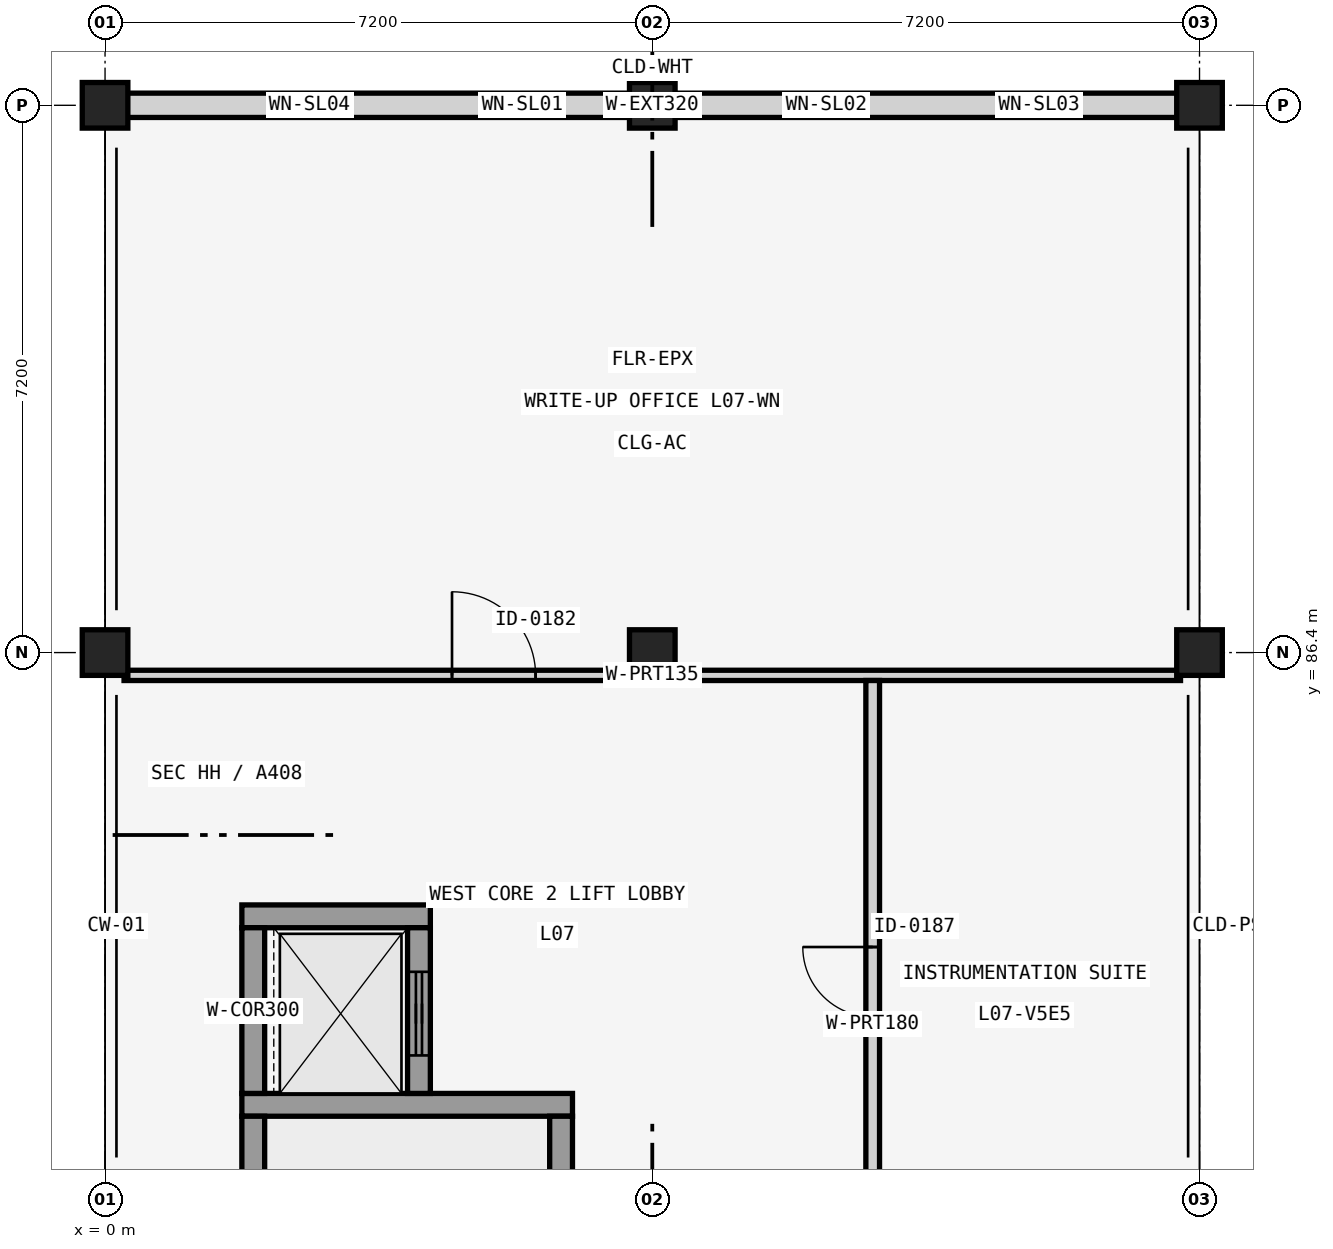
"""IFC4 building model, lengths in metres.
Left out: names, types, materials, properties, quantities, classifications, styles, units other than length and angle.
Written with IfcOpenShell. Run it as: python <this file> out.ifc"""

import sys

from ifc_helpers import new_model, si_unit, direction, frame, frame_2d, origin, origin_2d, place, context, subcontext, project, spatial, rectangle, extrude, element, fill, save


model = new_model("IFC4")
c1 = context("Model", 3, precision=1e-05, world=origin(), true_north=direction((0.0, 1.0)))
c2 = subcontext(c1, "Body", "Model", "MODEL_VIEW")
j1 = project(units=[si_unit("LENGTHUNIT", "METRE"), si_unit("PLANEANGLEUNIT", "RADIAN")], contexts=[c1])
p1 = place(None, origin())
s1 = spatial("IfcSite", under=j1, at=p1, CompositionType="ELEMENT")
p2 = place(p1, origin())
s2 = spatial("IfcBuilding", under=s1, at=p2, CompositionType="ELEMENT")
p3 = place(p2, frame((0.0, 0.0, 29.76)))
s3 = spatial("IfcBuildingStorey", under=s2, at=p3, CompositionType="ELEMENT", Elevation=29.76)
for number, where, z_axis, x_axis in (
    (1, (0.0, 86.4, 0.0), (0.0, 0.0, 1.0), (1.0, 0.0, 0.0)),
    (2, (0.0, 93.6, 0.0), (0.0, 0.0, 1.0), (1.0, 0.0, 0.0)),
    (3, (7.2, 86.4, 0.0), (0.0, 0.0, 1.0), (1.0, 0.0, 0.0)),
    (4, (7.2, 93.6, 0.0), (0.0, 0.0, 1.0), (1.0, 0.0, 0.0)),
    (5, (14.4, 86.4, 0.0), (0.0, 0.0, 1.0), (1.0, 0.0, 0.0)),
    (6, (14.4, 93.6, 0.0), (0.0, 0.0, 1.0), (1.0, 0.0, 0.0)),
):
    element("IfcColumn", number, at=place(p3, frame(where, z_axis=z_axis, x_axis=x_axis)), inside=s3, PredefinedType="COLUMN", context=c2, shape_type="SweptSolid", body=[
        extrude(rectangle(XDim=0.6, YDim=0.6, at=origin_2d()), origin(), (0.0, 0.0, 1.0), 4.16),
    ])
p4 = place(p3, frame((0.29, 93.6, 0.0), z_axis=(0.0, 0.0, 1.0), x_axis=(1.0, 0.0, 0.0)))
e7 = element("IfcWall", 7, at=p4, inside=s3, PredefinedType="SOLIDWALL", context=c2, shape_type="SweptSolid", body=[
    extrude(rectangle(XDim=13.82, YDim=0.32, at=frame_2d((6.91, 0.0))), origin(), (0.0, 0.0, 1.0), 3.21),
])
p5 = place(p4, frame((2.175, 0.0, 0.85)))
e8 = element("IfcOpeningElement", 8, at=p5, cuts=e7, PredefinedType="OPENING", context=c2, shape_type="SweptSolid", body=[
    extrude(rectangle(XDim=0.45, YDim=2.1, at=frame_2d((0.225, 1.05))), frame((0.0, 0.17, 0.0), z_axis=(0.0, -1.0, 0.0), x_axis=(1.0, 0.0, 0.0)), (0.0, 0.0, 1.0), 0.34),
])
p6 = place(p4, frame((4.975, 0.0, 0.65)))
e9 = element("IfcOpeningElement", 9, at=p6, cuts=e7, PredefinedType="OPENING", context=c2, shape_type="SweptSolid", body=[
    extrude(rectangle(XDim=0.45, YDim=2.4, at=frame_2d((0.225, 1.2))), frame((0.0, 0.17, 0.0), z_axis=(0.0, -1.0, 0.0), x_axis=(1.0, 0.0, 0.0)), (0.0, 0.0, 1.0), 0.34),
])
p7 = place(p4, frame((8.95, 0.0, 0.65)))
e10 = element("IfcOpeningElement", 10, at=p7, cuts=e7, PredefinedType="OPENING", context=c2, shape_type="SweptSolid", body=[
    extrude(rectangle(XDim=0.5, YDim=2.4, at=frame_2d((0.25, 1.2))), frame((0.0, 0.17, 0.0), z_axis=(0.0, -1.0, 0.0), x_axis=(1.0, 0.0, 0.0)), (0.0, 0.0, 1.0), 0.34),
])
p8 = place(p4, frame((11.725, 0.0, 0.85)))
e11 = element("IfcOpeningElement", 11, at=p8, cuts=e7, PredefinedType="OPENING", context=c2, shape_type="SweptSolid", body=[
    extrude(rectangle(XDim=0.55, YDim=2.2, at=frame_2d((0.275, 1.1))), frame((0.0, 0.17, 0.0), z_axis=(0.0, -1.0, 0.0), x_axis=(1.0, 0.0, 0.0)), (0.0, 0.0, 1.0), 0.34),
])
p9 = place(p3, frame((1.8, 80.45, 0.0), z_axis=(0.0, 0.0, 1.0), x_axis=(1.0, 0.0, 0.0)))
e12 = element("IfcWall", 12, at=p9, inside=s3, PredefinedType="SHEAR", context=c2, shape_type="SweptSolid", body=[
    extrude(rectangle(XDim=4.35, YDim=0.3, at=frame_2d((2.175, 0.0))), origin(), (0.0, 0.0, 1.0), 3.81),
])
p10 = place(p3, frame((1.95, 72.5, 0.0), z_axis=(0.0, 0.0, 1.0), x_axis=(0.0, 1.0, 0.0)))
e13 = element("IfcWall", 13, at=p10, inside=s3, PredefinedType="SHEAR", context=c2, shape_type="SweptSolid", body=[
    extrude(rectangle(XDim=7.8, YDim=0.3, at=frame_2d((3.9, 0.0))), origin(), (0.0, 0.0, 1.0), 3.81),
])
p11 = place(p3, frame((6.0, 72.5, 0.0), z_axis=(0.0, 0.0, 1.0), x_axis=(0.0, 1.0, 0.0)))
e14 = element("IfcWall", 14, at=p11, inside=s3, PredefinedType="SHEAR", context=c2, shape_type="SweptSolid", body=[
    extrude(rectangle(XDim=7.8, YDim=0.3, at=frame_2d((3.9, 0.0))), origin(), (0.0, 0.0, 1.0), 3.81),
])
p12 = place(p11, frame((0.4, 0.0, 0.0)))
e15 = element("IfcOpeningElement", 15, at=p12, cuts=e14, PredefinedType="OPENING", context=c2, shape_type="SweptSolid", body=[
    extrude(rectangle(XDim=1.15, YDim=2.2, at=frame_2d((0.575, 1.1))), frame((0.0, 0.16, 0.0), z_axis=(0.0, -1.0, 0.0), x_axis=(1.0, 0.0, 0.0)), (0.0, 0.0, 1.0), 0.32),
])
p13 = place(p3, frame((1.8, 82.93, 0.0), z_axis=(0.0, 0.0, 1.0), x_axis=(1.0, 0.0, 0.0)))
e16 = element("IfcWall", 16, at=p13, inside=s3, PredefinedType="SHEAR", context=c2, shape_type="SweptSolid", body=[
    extrude(rectangle(XDim=2.48, YDim=0.3, at=frame_2d((1.24, 0.0))), origin(), (0.0, 0.0, 1.0), 3.81),
])
p14 = place(p3, frame((1.95, 80.6, 0.0), z_axis=(0.0, 0.0, 1.0), x_axis=(0.0, 1.0, 0.0)))
e17 = element("IfcWall", 17, at=p14, inside=s3, PredefinedType="SHEAR", context=c2, shape_type="SweptSolid", body=[
    extrude(rectangle(XDim=2.18, YDim=0.3, at=frame_2d((1.09, 0.0))), origin(), (0.0, 0.0, 1.0), 3.81),
])
p15 = place(p3, frame((4.13, 80.6, 0.0), z_axis=(0.0, 0.0, 1.0), x_axis=(0.0, 1.0, 0.0)))
e18 = element("IfcWall", 18, at=p15, inside=s3, PredefinedType="SHEAR", context=c2, shape_type="SweptSolid", body=[
    extrude(rectangle(XDim=2.18, YDim=0.3, at=frame_2d((1.09, 0.0))), origin(), (0.0, 0.0, 1.0), 3.81),
])
p16 = place(p15, frame((0.5, 0.0, 0.0)))
e19 = element("IfcOpeningElement", 19, at=p16, cuts=e18, PredefinedType="OPENING", context=c2, shape_type="SweptSolid", body=[
    extrude(rectangle(XDim=1.1, YDim=2.2, at=frame_2d((0.55, 1.1))), frame((0.0, 0.16, 0.0), z_axis=(0.0, -1.0, 0.0), x_axis=(1.0, 0.0, 0.0)), (0.0, 0.0, 1.0), 0.32),
])
p17 = place(p3, frame((0.25, 86.1, 0.0), z_axis=(0.0, 0.0, 1.0), x_axis=(1.0, 0.0, 0.0)))
e20 = element("IfcWall", 20, at=p17, inside=s3, PredefinedType="PARTITIONING", context=c2, shape_type="SweptSolid", body=[
    extrude(rectangle(XDim=13.9, YDim=0.135, at=frame_2d((6.95, 0.0))), origin(), (0.0, 0.0, 1.0), 3.21),
])
p18 = place(p17, frame((4.315, 0.0, 0.0)))
e21 = element("IfcOpeningElement", 21, at=p18, cuts=e20, PredefinedType="OPENING", context=c2, shape_type="SweptSolid", body=[
    extrude(rectangle(XDim=1.1, YDim=2.15, at=frame_2d((0.55, 1.075))), frame((0.0, 0.078, 0.0), z_axis=(0.0, -1.0, 0.0), x_axis=(1.0, 0.0, 0.0)), (0.0, 0.0, 1.0), 0.155),
])
p19 = place(p3, frame((10.1, 78.1, 0.0), z_axis=(0.0, 0.0, 1.0), x_axis=(0.0, 1.0, 0.0)))
e22 = element("IfcWall", 22, at=p19, inside=s3, PredefinedType="PARTITIONING", context=c2, shape_type="SweptSolid", body=[
    extrude(rectangle(XDim=7.932, YDim=0.18, at=frame_2d((3.966, 0.0))), origin(), (0.0, 0.0, 1.0), 3.81),
])
p20 = place(p19, frame((3.506, 0.0, 0.0)))
e23 = element("IfcOpeningElement", 23, at=p20, cuts=e22, PredefinedType="OPENING", context=c2, shape_type="SweptSolid", body=[
    extrude(rectangle(XDim=0.92, YDim=2.1, at=frame_2d((0.46, 1.05))), frame((0.0, 0.1, 0.0), z_axis=(0.0, -1.0, 0.0), x_axis=(1.0, 0.0, 0.0)), (0.0, 0.0, 1.0), 0.2),
])
p21 = place(p5, origin())
e24 = element("IfcWindow", 24, at=p21, inside=s3, PartitioningType="SINGLE_PANEL", PredefinedType="WINDOW", context=c2, shape_type="SweptSolid", body=[
    extrude(rectangle(XDim=0.45, YDim=2.1, at=frame_2d((0.225, 1.05))), frame((0.0, 0.03, 0.0), z_axis=(0.0, -1.0, 0.0), x_axis=(1.0, 0.0, 0.0)), (0.0, 0.0, 1.0), 0.06),
])
fill(e8, e24)
p22 = place(p6, origin())
e25 = element("IfcWindow", 25, at=p22, inside=s3, PartitioningType="SINGLE_PANEL", PredefinedType="WINDOW", context=c2, shape_type="SweptSolid", body=[
    extrude(rectangle(XDim=0.45, YDim=2.4, at=frame_2d((0.225, 1.2))), frame((0.0, 0.03, 0.0), z_axis=(0.0, -1.0, 0.0), x_axis=(1.0, 0.0, 0.0)), (0.0, 0.0, 1.0), 0.06),
])
fill(e9, e25)
p23 = place(p7, origin())
e26 = element("IfcWindow", 26, at=p23, inside=s3, PartitioningType="SINGLE_PANEL", PredefinedType="WINDOW", context=c2, shape_type="SweptSolid", body=[
    extrude(rectangle(XDim=0.5, YDim=2.4, at=frame_2d((0.25, 1.2))), frame((0.0, 0.03, 0.0), z_axis=(0.0, -1.0, 0.0), x_axis=(1.0, 0.0, 0.0)), (0.0, 0.0, 1.0), 0.06),
])
fill(e10, e26)
p24 = place(p8, origin())
e27 = element("IfcWindow", 27, at=p24, inside=s3, PartitioningType="SINGLE_PANEL", PredefinedType="WINDOW", context=c2, shape_type="SweptSolid", body=[
    extrude(rectangle(XDim=0.55, YDim=2.2, at=frame_2d((0.275, 1.1))), frame((0.0, 0.03, 0.0), z_axis=(0.0, -1.0, 0.0), x_axis=(1.0, 0.0, 0.0)), (0.0, 0.0, 1.0), 0.06),
])
fill(e11, e27)
p25 = place(p16, origin())
e28 = element("IfcDoor", 28, at=p25, inside=s3, OperationType="SLIDING_TO_LEFT", PredefinedType="DOOR", context=c2, shape_type="SweptSolid", body=[
    extrude(rectangle(XDim=1.1, YDim=2.2, at=frame_2d((0.55, 1.1))), frame((0.0, 0.025, 0.0), z_axis=(0.0, -1.0, 0.0), x_axis=(1.0, 0.0, 0.0)), (0.0, 0.0, 1.0), 0.05),
])
fill(e19, e28)
p26 = place(p18, origin())
e29 = element("IfcDoor", 29, at=p26, inside=s3, OperationType="SINGLE_SWING_LEFT", PredefinedType="DOOR", context=c2, shape_type="SweptSolid", body=[
    extrude(rectangle(XDim=1.1, YDim=2.15, at=frame_2d((0.55, 1.075))), frame((0.0, 0.025, 0.0), z_axis=(0.0, -1.0, 0.0), x_axis=(1.0, 0.0, 0.0)), (0.0, 0.0, 1.0), 0.05),
])
fill(e21, e29)
p27 = place(p20, origin())
e30 = element("IfcDoor", 30, at=p27, inside=s3, OperationType="SINGLE_SWING_RIGHT", PredefinedType="DOOR", context=c2, shape_type="SweptSolid", body=[
    extrude(rectangle(XDim=0.92, YDim=2.1, at=frame_2d((0.46, 1.05))), frame((0.0, 0.025, 0.0), z_axis=(0.0, -1.0, 0.0), x_axis=(1.0, 0.0, 0.0)), (0.0, 0.0, 1.0), 0.05),
])
fill(e23, e30)
save(model, sys.argv[1])
